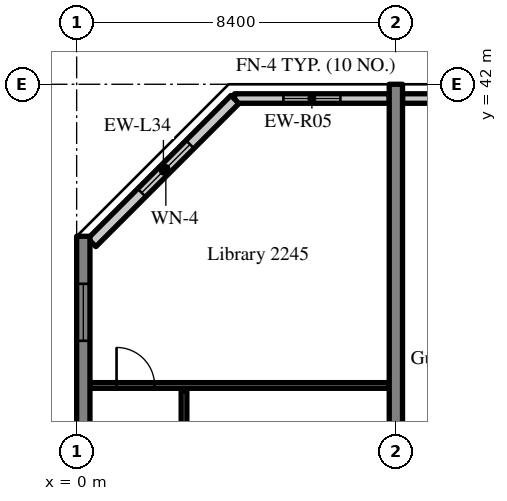
"""IFC4 building model, lengths in metres.
Left out: names, types, materials, properties, quantities, classifications, styles, units other than length and angle.
Written with IfcOpenShell. Run it as: python <this file> out.ifc"""

import sys

from ifc_helpers import new_model, si_unit, direction, frame, frame_2d, origin, place, context, subcontext, project, spatial, rectangle, extrude, source, transform, mapped, element, fill, save


model = new_model("IFC4")
c1 = context("Model", 3, precision=1e-05, world=origin(), true_north=direction((0.0, 1.0)))
c2 = subcontext(c1, "Body", "Model", "MODEL_VIEW")
j1 = project(units=[si_unit("LENGTHUNIT", "METRE"), si_unit("PLANEANGLEUNIT", "RADIAN")], contexts=[c1])
p1 = place(None, origin())
s1 = spatial("IfcSite", under=j1, at=p1, CompositionType="ELEMENT")
p2 = place(p1, origin())
s2 = spatial("IfcBuilding", under=s1, at=p2, CompositionType="ELEMENT")
p3 = place(p2, frame((0.0, 0.0, 95.2)))
s3 = spatial("IfcBuildingStorey", under=s2, at=p3, CompositionType="ELEMENT", Elevation=95.2)
m1 = source(origin(), c2, "Body", "SweptSolid", [
    extrude(rectangle(XDim=16.0, YDim=0.35, at=frame_2d((8.0, 0.0))), origin(), (0.0, 0.0, 1.0), 3.52),
])
p4 = place(p3, frame((0.175, 22.0, 0.0), z_axis=(0.0, 0.0, 1.0), x_axis=(0.0, 1.0, 0.0)))
e1 = element("IfcWall", 1, at=p4, inside=s3, PredefinedType="SHEAR", context=c2, shape_type="MappedRepresentation", body=[
    mapped(m1, transform((0.0, 0.0, 0.0), scale=1.0)),
])
m2 = source(origin(), c2, "Body", "SweptSolid", [
    extrude(rectangle(XDim=1.5, YDim=1.5, at=frame_2d((0.75, 0.75))), frame((0.0, 0.185, 0.0), z_axis=(0.0, -1.0, 0.0), x_axis=(1.0, 0.0, 0.0)), (0.0, 0.0, 1.0), 0.37),
])
p5 = place(p4, frame((1.25, 0.0, 0.9)))
e2 = element("IfcOpeningElement", 2, at=p5, cuts=e1, PredefinedType="OPENING", context=c2, shape_type="MappedRepresentation", body=[
    mapped(m2, transform((0.0, 0.0, 0.0), scale=1.0)),
])
p6 = place(p4, frame((5.25, 0.0, 0.9)))
e3 = element("IfcOpeningElement", 3, at=p6, cuts=e1, PredefinedType="OPENING", context=c2, shape_type="MappedRepresentation", body=[
    mapped(m2, transform((0.0, 0.0, 0.0), scale=1.0)),
])
p7 = place(p4, frame((9.25, 0.0, 0.9)))
e4 = element("IfcOpeningElement", 4, at=p7, cuts=e1, PredefinedType="OPENING", context=c2, shape_type="MappedRepresentation", body=[
    mapped(m2, transform((0.0, 0.0, 0.0), scale=1.0)),
])
p8 = place(p4, frame((13.25, 0.0, 0.9)))
e5 = element("IfcOpeningElement", 5, at=p8, cuts=e1, PredefinedType="OPENING", context=c2, shape_type="MappedRepresentation", body=[
    mapped(m2, transform((0.0, 0.0, 0.0), scale=1.0)),
])
m3 = source(origin(), c2, "Body", "SweptSolid", [
    extrude(rectangle(XDim=20.0, YDim=0.35, at=frame_2d((10.0, 0.0))), origin(), (0.0, 0.0, 1.0), 3.52),
])
p9 = place(p3, frame((8.4, 22.0, 0.0), z_axis=(0.0, 0.0, 1.0), x_axis=(0.0, 1.0, 0.0)))
e6 = element("IfcWall", 6, at=p9, inside=s3, PredefinedType="SHEAR", context=c2, shape_type="MappedRepresentation", body=[
    mapped(m3, transform((0.0, 0.0, 0.0), scale=1.0)),
])
m4 = source(origin(), c2, "Body", "SweptSolid", [
    extrude(rectangle(XDim=4.07, YDim=0.25, at=frame_2d((2.035, 0.0))), origin(), (0.0, 0.0, 1.0), 2.82),
])
p10 = place(p3, frame((8.225, 41.625, 0.0), z_axis=(0.0, 0.0, 1.0), x_axis=(-1.0, 0.0, 0.0)))
e7 = element("IfcWall", 7, at=p10, inside=s3, PredefinedType="SOLIDWALL", context=c2, shape_type="MappedRepresentation", body=[
    mapped(m4, transform((0.0, 0.0, 0.0), scale=1.0)),
])
m5 = source(origin(), c2, "Body", "SweptSolid", [
    extrude(rectangle(XDim=1.5, YDim=1.5, at=frame_2d((0.75, 0.75))), frame((0.0, 0.135, 0.0), z_axis=(0.0, -1.0, 0.0), x_axis=(1.0, 0.0, 0.0)), (0.0, 0.0, 1.0), 0.27),
])
p11 = place(p10, frame((1.285, 0.0, 0.9)))
e8 = element("IfcOpeningElement", 8, at=p11, cuts=e7, PredefinedType="OPENING", context=c2, shape_type="MappedRepresentation", body=[
    mapped(m5, transform((0.0, 0.0, 0.0), scale=1.0)),
])
m6 = source(origin(), c2, "Body", "SweptSolid", [
    extrude(rectangle(XDim=3.675, YDim=0.25, at=frame_2d((1.837, 0.0))), origin(), (0.0, 0.0, 1.0), 2.82),
])
p12 = place(p3, frame((12.25, 41.625, 0.0), z_axis=(0.0, 0.0, 1.0), x_axis=(-1.0, 0.0, 0.0)))
e9 = element("IfcWall", 9, at=p12, inside=s3, PredefinedType="SOLIDWALL", context=c2, shape_type="MappedRepresentation", body=[
    mapped(m6, transform((0.0, 0.0, 0.0), scale=1.0)),
])
p13 = place(p12, frame((1.087, 0.0, 0.9)))
e10 = element("IfcOpeningElement", 10, at=p13, cuts=e9, PredefinedType="OPENING", context=c2, shape_type="MappedRepresentation", body=[
    mapped(m5, transform((0.0, 0.0, 0.0), scale=1.0)),
])
m7 = source(origin(), c2, "Body", "SweptSolid", [
    extrude(rectangle(XDim=5.326, YDim=0.3, at=frame_2d((2.663, 0.0))), origin(), (0.0, 0.0, 1.0), 3.52),
])
p14 = place(p3, frame((4.166, 41.6, 0.0), z_axis=(0.0, 0.0, 1.0), x_axis=(-0.707106781187, -0.707106781187, 0.0)))
e11 = element("IfcWall", 11, at=p14, inside=s3, PredefinedType="SOLIDWALL", context=c2, shape_type="MappedRepresentation", body=[
    mapped(m7, transform((0.0, 0.0, 0.0), scale=1.0)),
])
m8 = source(origin(), c2, "Body", "SweptSolid", [
    extrude(rectangle(XDim=1.8, YDim=1.5, at=frame_2d((0.9, 0.75))), frame((0.0, 0.16, 0.0), z_axis=(0.0, -1.0, 0.0), x_axis=(1.0, 0.0, 0.0)), (0.0, 0.0, 1.0), 0.32),
])
p15 = place(p14, frame((1.672, 0.0, 0.9)))
e12 = element("IfcOpeningElement", 12, at=p15, cuts=e11, PredefinedType="OPENING", context=c2, shape_type="MappedRepresentation", body=[
    mapped(m8, transform((0.0, 0.0, 0.0), scale=1.0)),
])
m9 = source(origin(), c2, "Body", "SweptSolid", [
    extrude(rectangle(XDim=4.45, YDim=0.15, at=frame_2d((2.225, 0.0))), origin(), (0.0, 0.0, 1.0), 3.52),
])
p16 = place(p3, frame((2.825, 29.475, 0.0), z_axis=(0.0, 0.0, 1.0), x_axis=(0.0, 1.0, 0.0)))
e13 = element("IfcWall", 13, at=p16, inside=s3, PredefinedType="PARTITIONING", context=c2, shape_type="MappedRepresentation", body=[
    mapped(m9, transform((0.0, 0.0, 0.0), scale=1.0)),
])
m10 = source(origin(), c2, "Body", "SweptSolid", [
    extrude(rectangle(XDim=1.0, YDim=2.1, at=frame_2d((0.5, 1.05))), frame((0.0, 0.085, 0.0), z_axis=(0.0, -1.0, 0.0), x_axis=(1.0, 0.0, 0.0)), (0.0, 0.0, 1.0), 0.17),
])
p17 = place(p16, frame((1.725, 0.0, 0.0)))
e14 = element("IfcOpeningElement", 14, at=p17, cuts=e13, PredefinedType="OPENING", context=c2, shape_type="MappedRepresentation", body=[
    mapped(m10, transform((0.0, 0.0, 0.0), scale=1.0)),
])
m11 = source(origin(), c2, "Body", "SweptSolid", [
    extrude(rectangle(XDim=7.875, YDim=0.15, at=frame_2d((3.938, 0.0))), origin(), (0.0, 0.0, 1.0), 3.52),
])
p18 = place(p3, frame((0.35, 34.075, 0.0), z_axis=(0.0, 0.0, 1.0), x_axis=(1.0, 0.0, 0.0)))
e15 = element("IfcWall", 15, at=p18, inside=s3, PredefinedType="PARTITIONING", context=c2, shape_type="MappedRepresentation", body=[
    mapped(m11, transform((0.0, 0.0, 0.0), scale=1.0)),
])
p19 = place(p18, frame((0.7, 0.0, 0.0)))
e16 = element("IfcOpeningElement", 16, at=p19, cuts=e15, PredefinedType="OPENING", context=c2, shape_type="MappedRepresentation", body=[
    mapped(m10, transform((0.0, 0.0, 0.0), scale=1.0)),
])
m12 = source(origin(), c2, "Body", "SweptSolid", [
    extrude(rectangle(XDim=1.5, YDim=1.5, at=frame_2d((0.75, 0.75))), frame((0.0, 0.03, 0.0), z_axis=(0.0, -1.0, 0.0), x_axis=(1.0, 0.0, 0.0)), (0.0, 0.0, 1.0), 0.06),
])
p20 = place(p11, origin())
e17 = element("IfcWindow", 17, at=p20, inside=s3, PartitioningType="SINGLE_PANEL", PredefinedType="WINDOW", context=c2, shape_type="MappedRepresentation", body=[
    mapped(m12, transform((0.0, 0.0, 0.0), scale=1.0)),
])
fill(e8, e17)
m13 = source(origin(), c2, "Body", "SweptSolid", [
    extrude(rectangle(XDim=1.8, YDim=1.5, at=frame_2d((0.9, 0.75))), frame((0.0, 0.03, 0.0), z_axis=(0.0, -1.0, 0.0), x_axis=(1.0, 0.0, 0.0)), (0.0, 0.0, 1.0), 0.06),
])
p21 = place(p15, origin())
e18 = element("IfcWindow", 18, at=p21, inside=s3, PartitioningType="SINGLE_PANEL", PredefinedType="WINDOW", context=c2, shape_type="MappedRepresentation", body=[
    mapped(m13, transform((0.0, 0.0, 0.0), scale=1.0)),
])
fill(e12, e18)
p22 = place(p8, origin())
e19 = element("IfcWindow", 19, at=p22, inside=s3, PartitioningType="SINGLE_PANEL", PredefinedType="WINDOW", context=c2, shape_type="MappedRepresentation", body=[
    mapped(m12, transform((0.0, 0.0, 0.0), scale=1.0)),
])
fill(e5, e19)
m14 = source(origin(), c2, "Body", "SweptSolid", [
    extrude(rectangle(XDim=1.0, YDim=2.1, at=frame_2d((0.5, 1.05))), frame((0.0, 0.025, 0.0), z_axis=(0.0, -1.0, 0.0), x_axis=(1.0, 0.0, 0.0)), (0.0, 0.0, 1.0), 0.05),
])
p23 = place(p19, origin())
e20 = element("IfcDoor", 20, at=p23, inside=s3, OperationType="SINGLE_SWING_LEFT", PredefinedType="DOOR", context=c2, shape_type="MappedRepresentation", body=[
    mapped(m14, transform((0.0, 0.0, 0.0), scale=1.0)),
])
fill(e16, e20)
save(model, sys.argv[1])
